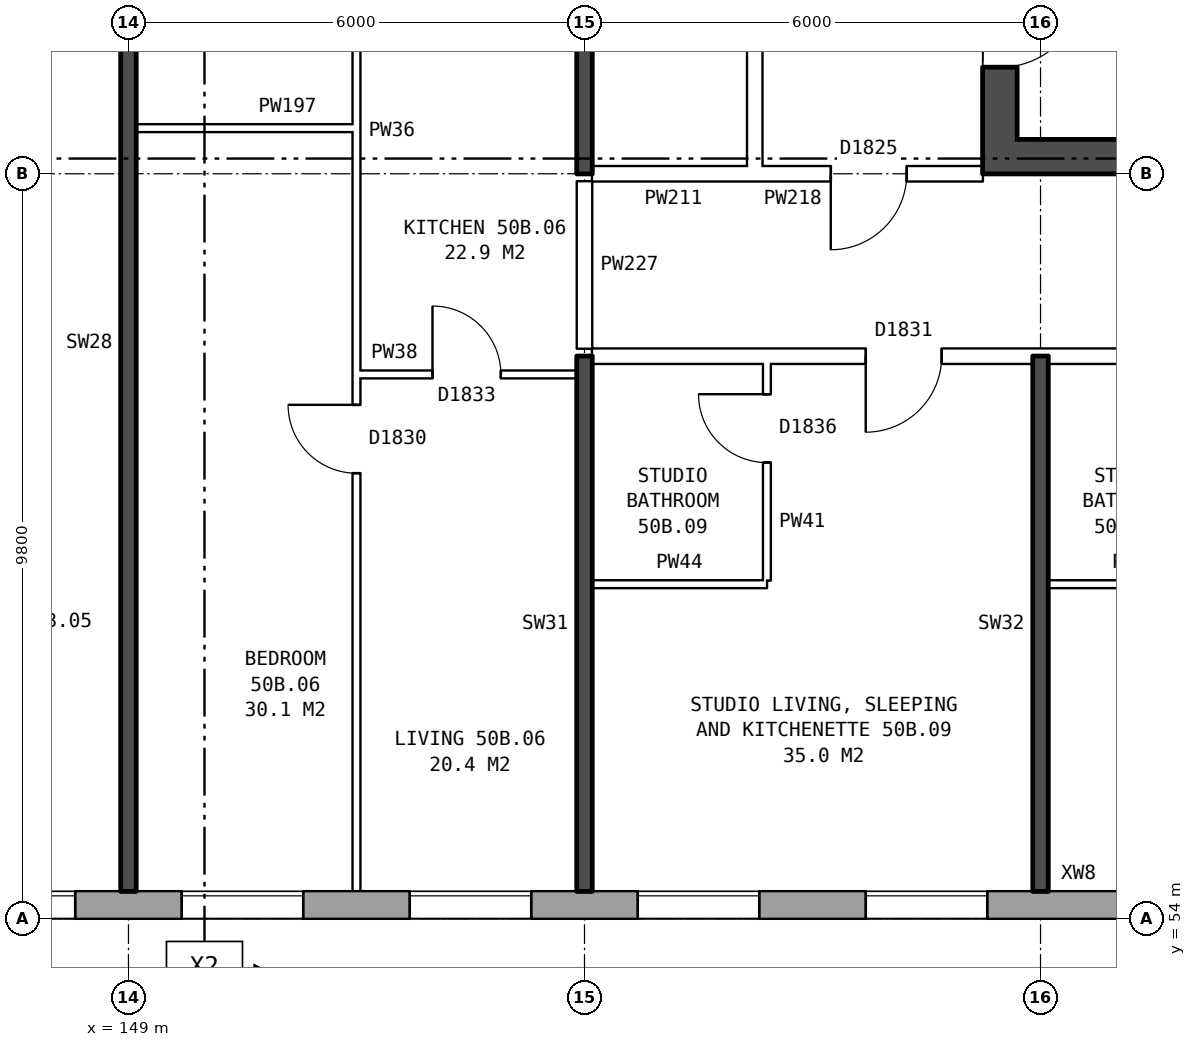
"""IFC4 building model, lengths in metres.
Left out: names, types, materials, properties, quantities, classifications, styles, units other than length and angle.
Written with IfcOpenShell. Run it as: python <this file> out.ifc"""

import sys

from ifc_helpers import new_model, si_unit, direction, frame, frame_2d, origin, place, context, subcontext, project, spatial, rectangle, extrude, element, fill, save


model = new_model("IFC4")
c1 = context("Model", 3, precision=1e-05, world=origin(), true_north=direction((0.0, 1.0)))
c2 = subcontext(c1, "Body", "Model", "MODEL_VIEW")
j1 = project(units=[si_unit("LENGTHUNIT", "METRE"), si_unit("PLANEANGLEUNIT", "RADIAN")], contexts=[c1])
p1 = place(None, origin())
s1 = spatial("IfcSite", under=j1, at=p1, CompositionType="ELEMENT")
p2 = place(p1, origin())
s2 = spatial("IfcBuilding", under=s1, at=p2, CompositionType="ELEMENT")
p3 = place(p2, frame((0.0, 0.0, 178.9)))
s3 = spatial("IfcBuildingStorey", under=s2, at=p3, CompositionType="ELEMENT", Elevation=178.9)
p4 = place(p3, frame((134.075, 54.18, 0.0), z_axis=(0.0, 0.0, 1.0), x_axis=(1.0, 0.0, 0.0)))
e1 = element("IfcWall", 1, at=p4, inside=s3, PredefinedType="STANDARD", context=c2, shape_type="SweptSolid", body=[
    extrude(rectangle(XDim=33.101, YDim=0.36, at=frame_2d((16.55, 0.0))), origin(), (0.0, 0.0, 1.0), 2.85),
])
p5 = place(p4, frame((0.625, 0.0, 0.8)))
e2 = element("IfcOpeningElement", 2, at=p5, cuts=e1, PredefinedType="OPENING", context=c2, shape_type="SweptSolid", body=[
    extrude(rectangle(XDim=1.6, YDim=1.8, at=frame_2d((0.8, 0.9))), frame((0.0, 0.19, 0.0), z_axis=(0.0, -1.0, 0.0), x_axis=(1.0, 0.0, 0.0)), (0.0, 0.0, 1.0), 0.38),
])
p6 = place(p4, frame((3.125, 0.0, 1.1)))
e3 = element("IfcOpeningElement", 3, at=p6, cuts=e1, PredefinedType="OPENING", context=c2, shape_type="SweptSolid", body=[
    extrude(rectangle(XDim=0.8, YDim=1.5, at=frame_2d((0.4, 0.75))), frame((0.0, 0.19, 0.0), z_axis=(0.0, -1.0, 0.0), x_axis=(1.0, 0.0, 0.0)), (0.0, 0.0, 1.0), 0.38),
])
p7 = place(p4, frame((6.625, 0.0, 0.8)))
e4 = element("IfcOpeningElement", 4, at=p7, cuts=e1, PredefinedType="OPENING", context=c2, shape_type="SweptSolid", body=[
    extrude(rectangle(XDim=1.6, YDim=1.8, at=frame_2d((0.8, 0.9))), frame((0.0, 0.19, 0.0), z_axis=(0.0, -1.0, 0.0), x_axis=(1.0, 0.0, 0.0)), (0.0, 0.0, 1.0), 0.38),
])
p8 = place(p4, frame((9.625, 0.0, 0.8)))
e5 = element("IfcOpeningElement", 5, at=p8, cuts=e1, PredefinedType="OPENING", context=c2, shape_type="SweptSolid", body=[
    extrude(rectangle(XDim=1.6, YDim=1.8, at=frame_2d((0.8, 0.9))), frame((0.0, 0.19, 0.0), z_axis=(0.0, -1.0, 0.0), x_axis=(1.0, 0.0, 0.0)), (0.0, 0.0, 1.0), 0.38),
])
p9 = place(p4, frame((12.625, 0.0, 0.8)))
e6 = element("IfcOpeningElement", 6, at=p9, cuts=e1, PredefinedType="OPENING", context=c2, shape_type="SweptSolid", body=[
    extrude(rectangle(XDim=1.6, YDim=1.8, at=frame_2d((0.8, 0.9))), frame((0.0, 0.19, 0.0), z_axis=(0.0, -1.0, 0.0), x_axis=(1.0, 0.0, 0.0)), (0.0, 0.0, 1.0), 0.38),
])
p10 = place(p4, frame((15.625, 0.0, 0.8)))
e7 = element("IfcOpeningElement", 7, at=p10, cuts=e1, PredefinedType="OPENING", context=c2, shape_type="SweptSolid", body=[
    extrude(rectangle(XDim=1.6, YDim=1.8, at=frame_2d((0.8, 0.9))), frame((0.0, 0.19, 0.0), z_axis=(0.0, -1.0, 0.0), x_axis=(1.0, 0.0, 0.0)), (0.0, 0.0, 1.0), 0.38),
])
p11 = place(p4, frame((18.625, 0.0, 0.8)))
e8 = element("IfcOpeningElement", 8, at=p11, cuts=e1, PredefinedType="OPENING", context=c2, shape_type="SweptSolid", body=[
    extrude(rectangle(XDim=1.6, YDim=1.8, at=frame_2d((0.8, 0.9))), frame((0.0, 0.19, 0.0), z_axis=(0.0, -1.0, 0.0), x_axis=(1.0, 0.0, 0.0)), (0.0, 0.0, 1.0), 0.38),
])
p12 = place(p4, frame((21.625, 0.0, 0.8)))
e9 = element("IfcOpeningElement", 9, at=p12, cuts=e1, PredefinedType="OPENING", context=c2, shape_type="SweptSolid", body=[
    extrude(rectangle(XDim=1.6, YDim=1.8, at=frame_2d((0.8, 0.9))), frame((0.0, 0.19, 0.0), z_axis=(0.0, -1.0, 0.0), x_axis=(1.0, 0.0, 0.0)), (0.0, 0.0, 1.0), 0.38),
])
p13 = place(p4, frame((24.625, 0.0, 0.8)))
e10 = element("IfcOpeningElement", 10, at=p13, cuts=e1, PredefinedType="OPENING", context=c2, shape_type="SweptSolid", body=[
    extrude(rectangle(XDim=1.6, YDim=1.8, at=frame_2d((0.8, 0.9))), frame((0.0, 0.19, 0.0), z_axis=(0.0, -1.0, 0.0), x_axis=(1.0, 0.0, 0.0)), (0.0, 0.0, 1.0), 0.38),
])
p14 = place(p4, frame((28.625, 0.0, 1.7)))
e11 = element("IfcOpeningElement", 11, at=p14, cuts=e1, PredefinedType="OPENING", context=c2, shape_type="SweptSolid", body=[
    extrude(rectangle(XDim=0.6, YDim=0.9, at=frame_2d((0.3, 0.45))), frame((0.0, 0.19, 0.0), z_axis=(0.0, -1.0, 0.0), x_axis=(1.0, 0.0, 0.0)), (0.0, 0.0, 1.0), 0.38),
])
p15 = place(p4, frame((30.625, 0.0, 0.8)))
e12 = element("IfcOpeningElement", 12, at=p15, cuts=e1, PredefinedType="OPENING", context=c2, shape_type="SweptSolid", body=[
    extrude(rectangle(XDim=1.6, YDim=1.8, at=frame_2d((0.8, 0.9))), frame((0.0, 0.19, 0.0), z_axis=(0.0, -1.0, 0.0), x_axis=(1.0, 0.0, 0.0)), (0.0, 0.0, 1.0), 0.38),
])
p16 = place(p4, frame((5.475, 0.0, 0.8)))
e13 = element("IfcOpeningElement", 13, at=p16, cuts=e1, PredefinedType="OPENING", context=c2, shape_type="SweptSolid", body=[
    extrude(rectangle(XDim=0.8, YDim=0.9, at=frame_2d((0.4, 0.45))), frame((0.0, 0.19, 0.0), z_axis=(0.0, -1.0, 0.0), x_axis=(1.0, 0.0, 0.0)), (0.0, 0.0, 1.0), 0.38),
])
p17 = place(p4, frame((29.525, 0.0, 0.8)))
e14 = element("IfcOpeningElement", 14, at=p17, cuts=e1, PredefinedType="OPENING", context=c2, shape_type="SweptSolid", body=[
    extrude(rectangle(XDim=0.8, YDim=1.8, at=frame_2d((0.4, 0.9))), frame((0.0, 0.19, 0.0), z_axis=(0.0, -1.0, 0.0), x_axis=(1.0, 0.0, 0.0)), (0.0, 0.0, 1.0), 0.38),
])
p18 = place(p3, frame((160.465, 76.2, 0.0), z_axis=(0.0, 0.0, 1.0), x_axis=(0.0, -1.0, 0.0)))
e15 = element("IfcWall", 15, at=p18, inside=s3, PredefinedType="SHEAR", context=c2, shape_type="SweptSolid", body=[
    extrude(rectangle(XDim=12.4, YDim=0.45, at=frame_2d((6.2, 0.0))), origin(), (0.0, 0.0, 1.0), 2.85),
])
p19 = place(p18, frame((1.325, 0.0, 0.0)))
e16 = element("IfcOpeningElement", 16, at=p19, cuts=e15, PredefinedType="OPENING", context=c2, shape_type="SweptSolid", body=[
    extrude(rectangle(XDim=1.1, YDim=2.1, at=frame_2d((0.55, 1.05))), frame((0.0, 0.235, 0.0), z_axis=(0.0, -1.0, 0.0), x_axis=(1.0, 0.0, 0.0)), (0.0, 0.0, 1.0), 0.47),
])
p20 = place(p18, frame((4.825, 0.0, 0.0)))
e17 = element("IfcOpeningElement", 17, at=p20, cuts=e15, PredefinedType="OPENING", context=c2, shape_type="SweptSolid", body=[
    extrude(rectangle(XDim=0.85, YDim=2.1, at=frame_2d((0.425, 1.05))), frame((0.0, 0.235, 0.0), z_axis=(0.0, -1.0, 0.0), x_axis=(1.0, 0.0, 0.0)), (0.0, 0.0, 1.0), 0.47),
])
p21 = place(p18, frame((9.9, 0.0, 0.0)))
e18 = element("IfcOpeningElement", 18, at=p21, cuts=e15, PredefinedType="OPENING", context=c2, shape_type="SweptSolid", body=[
    extrude(rectangle(XDim=1.1, YDim=2.1, at=frame_2d((0.55, 1.05))), frame((0.0, 0.235, 0.0), z_axis=(0.0, -1.0, 0.0), x_axis=(1.0, 0.0, 0.0)), (0.0, 0.0, 1.0), 0.47),
])
p22 = place(p18, frame((8.125, 0.0, 0.0)))
e19 = element("IfcOpeningElement", 19, at=p22, cuts=e15, PredefinedType="OPENING", context=c2, shape_type="SweptSolid", body=[
    extrude(rectangle(XDim=0.85, YDim=2.1, at=frame_2d((0.425, 1.05))), frame((0.0, 0.235, 0.0), z_axis=(0.0, -1.0, 0.0), x_axis=(1.0, 0.0, 0.0)), (0.0, 0.0, 1.0), 0.47),
])
p23 = place(p3, frame((160.69, 64.025, 0.0), z_axis=(0.0, 0.0, 1.0), x_axis=(1.0, 0.0, 0.0)))
e20 = element("IfcWall", 20, at=p23, inside=s3, PredefinedType="SHEAR", context=c2, shape_type="SweptSolid", body=[
    extrude(rectangle(XDim=7.5, YDim=0.45, at=frame_2d((3.75, 0.0))), origin(), (0.0, 0.0, 1.0), 2.85),
])
p24 = place(p3, frame((157.24, 63.9, 0.0), z_axis=(0.0, 0.0, 1.0), x_axis=(0.0, 1.0, 0.0)))
e21 = element("IfcWall", 21, at=p24, inside=s3, PredefinedType="PARTITIONING", context=c2, shape_type="SweptSolid", body=[
    extrude(rectangle(XDim=12.2, YDim=0.2, at=frame_2d((6.1, 0.0))), origin(), (0.0, 0.0, 1.0), 2.85),
])
p25 = place(p24, frame((5.1, 0.0, 0.0)))
e22 = element("IfcOpeningElement", 22, at=p25, cuts=e21, PredefinedType="OPENING", context=c2, shape_type="SweptSolid", body=[
    extrude(rectangle(XDim=2.0, YDim=2.1, at=frame_2d((1.0, 1.05))), frame((0.0, 0.11, 0.0), z_axis=(0.0, -1.0, 0.0), x_axis=(1.0, 0.0, 0.0)), (0.0, 0.0, 1.0), 0.22),
])
for number, where, z_axis, x_axis in (
    (23, (155.1, 58.4, 0.0), (0.0, 0.0, 1.0), (1.0, 0.0, 0.0)),
    (24, (161.1, 58.4, 0.0), (0.0, 0.0, 1.0), (1.0, 0.0, 0.0)),
):
    element("IfcWall", number, at=place(p3, frame(where, z_axis=z_axis, x_axis=x_axis)), inside=s3, PredefinedType="PARTITIONING", context=c2, shape_type="SweptSolid", body=[
        extrude(rectangle(XDim=2.3, YDim=0.1, at=frame_2d((1.15, 0.0))), origin(), (0.0, 0.0, 1.0), 2.85),
    ])
p26 = place(p3, frame((152.0, 61.16, 0.0), z_axis=(0.0, 0.0, 1.0), x_axis=(1.0, 0.0, 0.0)))
e25 = element("IfcWall", 25, at=p26, inside=s3, PredefinedType="PARTITIONING", context=c2, shape_type="SweptSolid", body=[
    extrude(rectangle(XDim=2.9, YDim=0.1, at=frame_2d((1.45, 0.0))), origin(), (0.0, 0.0, 1.0), 2.85),
])
p27 = place(p26, frame((1.0, 0.0, 0.0)))
e26 = element("IfcOpeningElement", 26, at=p27, cuts=e25, PredefinedType="OPENING", context=c2, shape_type="SweptSolid", body=[
    extrude(rectangle(XDim=0.9, YDim=2.1, at=frame_2d((0.45, 1.05))), frame((0.0, 0.06, 0.0), z_axis=(0.0, -1.0, 0.0), x_axis=(1.0, 0.0, 0.0)), (0.0, 0.0, 1.0), 0.12),
])
p28 = place(p3, frame((155.1, 61.4, 0.0), z_axis=(0.0, 0.0, 1.0), x_axis=(1.0, 0.0, 0.0)))
e27 = element("IfcWall", 27, at=p28, inside=s3, PredefinedType="PARTITIONING", context=c2, shape_type="SweptSolid", body=[
    extrude(rectangle(XDim=14.79, YDim=0.2, at=frame_2d((7.395, 0.0))), origin(), (0.0, 0.0, 1.0), 2.85),
])
p29 = place(p28, frame((3.6, 0.0, 0.0)))
e28 = element("IfcOpeningElement", 28, at=p29, cuts=e27, PredefinedType="OPENING", context=c2, shape_type="SweptSolid", body=[
    extrude(rectangle(XDim=1.0, YDim=2.1, at=frame_2d((0.5, 1.05))), frame((0.0, 0.11, 0.0), z_axis=(0.0, -1.0, 0.0), x_axis=(1.0, 0.0, 0.0)), (0.0, 0.0, 1.0), 0.22),
])
p30 = place(p28, frame((11.045, 0.0, 0.0)))
e29 = element("IfcOpeningElement", 29, at=p30, cuts=e27, PredefinedType="OPENING", context=c2, shape_type="SweptSolid", body=[
    extrude(rectangle(XDim=1.0, YDim=2.1, at=frame_2d((0.5, 1.05))), frame((0.0, 0.11, 0.0), z_axis=(0.0, -1.0, 0.0), x_axis=(1.0, 0.0, 0.0)), (0.0, 0.0, 1.0), 0.22),
])
p31 = place(p3, frame((155.1, 63.8, 0.0), z_axis=(0.0, 0.0, 1.0), x_axis=(1.0, 0.0, 0.0)))
e30 = element("IfcWall", 30, at=p31, inside=s3, PredefinedType="PARTITIONING", context=c2, shape_type="SweptSolid", body=[
    extrude(rectangle(XDim=2.14, YDim=0.2, at=frame_2d((1.07, 0.0))), origin(), (0.0, 0.0, 1.0), 2.85),
])
p32 = place(p3, frame((157.24, 63.8, 0.0), z_axis=(0.0, 0.0, 1.0), x_axis=(1.0, 0.0, 0.0)))
e31 = element("IfcWall", 31, at=p32, inside=s3, PredefinedType="PARTITIONING", context=c2, shape_type="SweptSolid", body=[
    extrude(rectangle(XDim=3.0, YDim=0.2, at=frame_2d((1.5, 0.0))), origin(), (0.0, 0.0, 1.0), 2.85),
])
p33 = place(p32, frame((1.0, 0.0, 0.0)))
e32 = element("IfcOpeningElement", 32, at=p33, cuts=e31, PredefinedType="OPENING", context=c2, shape_type="SweptSolid", body=[
    extrude(rectangle(XDim=1.0, YDim=2.1, at=frame_2d((0.5, 1.05))), frame((0.0, 0.11, 0.0), z_axis=(0.0, -1.0, 0.0), x_axis=(1.0, 0.0, 0.0)), (0.0, 0.0, 1.0), 0.22),
])
p34 = place(p3, frame((149.1, 64.4, 0.0), z_axis=(0.0, 0.0, 1.0), x_axis=(1.0, 0.0, 0.0)))
e33 = element("IfcWall", 33, at=p34, inside=s3, PredefinedType="PARTITIONING", context=c2, shape_type="SweptSolid", body=[
    extrude(rectangle(XDim=2.9, YDim=0.1, at=frame_2d((1.45, 0.0))), origin(), (0.0, 0.0, 1.0), 2.85),
])
p35 = place(p3, frame((149.0, 54.36, 0.0), z_axis=(0.0, 0.0, 1.0), x_axis=(0.0, 1.0, 0.0)))
e34 = element("IfcWall", 34, at=p35, inside=s3, PredefinedType="SOLIDWALL", context=c2, shape_type="SweptSolid", body=[
    extrude(rectangle(XDim=14.44, YDim=0.2, at=frame_2d((7.22, 0.0))), origin(), (0.0, 0.0, 1.0), 2.85),
])
p36 = place(p3, frame((152.0, 54.36, 0.0), z_axis=(0.0, 0.0, 1.0), x_axis=(0.0, 1.0, 0.0)))
e35 = element("IfcWall", 35, at=p36, inside=s3, PredefinedType="PARTITIONING", context=c2, shape_type="SweptSolid", body=[
    extrude(rectangle(XDim=14.34, YDim=0.1, at=frame_2d((7.17, 0.0))), origin(), (0.0, 0.0, 1.0), 2.85),
])
p37 = place(p36, frame((5.5, 0.0, 0.0)))
e36 = element("IfcOpeningElement", 36, at=p37, cuts=e35, PredefinedType="OPENING", context=c2, shape_type="SweptSolid", body=[
    extrude(rectangle(XDim=0.9, YDim=2.1, at=frame_2d((0.45, 1.05))), frame((0.0, 0.06, 0.0), z_axis=(0.0, -1.0, 0.0), x_axis=(1.0, 0.0, 0.0)), (0.0, 0.0, 1.0), 0.12),
])
p38 = place(p36, frame((13.04, 0.0, 0.0)))
e37 = element("IfcOpeningElement", 37, at=p38, cuts=e35, PredefinedType="OPENING", context=c2, shape_type="SweptSolid", body=[
    extrude(rectangle(XDim=0.9, YDim=2.1, at=frame_2d((0.45, 1.05))), frame((0.0, 0.06, 0.0), z_axis=(0.0, -1.0, 0.0), x_axis=(1.0, 0.0, 0.0)), (0.0, 0.0, 1.0), 0.12),
])
p39 = place(p3, frame((155.0, 54.36, 0.0), z_axis=(0.0, 0.0, 1.0), x_axis=(0.0, 1.0, 0.0)))
e38 = element("IfcWall", 38, at=p39, inside=s3, PredefinedType="SOLIDWALL", context=c2, shape_type="SweptSolid", body=[
    extrude(rectangle(XDim=7.04, YDim=0.2, at=frame_2d((3.52, 0.0))), origin(), (0.0, 0.0, 1.0), 2.85),
])
p40 = place(p3, frame((155.0, 61.5, 0.0), z_axis=(0.0, 0.0, 1.0), x_axis=(0.0, 1.0, 0.0)))
e39 = element("IfcWall", 39, at=p40, inside=s3, PredefinedType="PARTITIONING", context=c2, shape_type="SweptSolid", body=[
    extrude(rectangle(XDim=2.2, YDim=0.2, at=frame_2d((1.1, 0.0))), origin(), (0.0, 0.0, 1.0), 2.85),
])
p41 = place(p3, frame((155.0, 63.8, 0.0), z_axis=(0.0, 0.0, 1.0), x_axis=(0.0, 1.0, 0.0)))
e40 = element("IfcWall", 40, at=p41, inside=s3, PredefinedType="SOLIDWALL", context=c2, shape_type="SweptSolid", body=[
    extrude(rectangle(XDim=5.0, YDim=0.2, at=frame_2d((2.5, 0.0))), origin(), (0.0, 0.0, 1.0), 2.85),
])
p42 = place(p3, frame((157.4, 58.45, 0.0), z_axis=(0.0, 0.0, 1.0), x_axis=(0.0, 1.0, 0.0)))
e41 = element("IfcWall", 41, at=p42, inside=s3, PredefinedType="PARTITIONING", context=c2, shape_type="SweptSolid", body=[
    extrude(rectangle(XDim=2.85, YDim=0.1, at=frame_2d((1.425, 0.0))), origin(), (0.0, 0.0, 1.0), 2.85),
])
p43 = place(p42, frame((1.55, 0.0, 0.0)))
e42 = element("IfcOpeningElement", 42, at=p43, cuts=e41, PredefinedType="OPENING", context=c2, shape_type="SweptSolid", body=[
    extrude(rectangle(XDim=0.9, YDim=2.1, at=frame_2d((0.45, 1.05))), frame((0.0, 0.06, 0.0), z_axis=(0.0, -1.0, 0.0), x_axis=(1.0, 0.0, 0.0)), (0.0, 0.0, 1.0), 0.12),
])
p44 = place(p3, frame((161.0, 54.36, 0.0), z_axis=(0.0, 0.0, 1.0), x_axis=(0.0, 1.0, 0.0)))
e43 = element("IfcWall", 43, at=p44, inside=s3, PredefinedType="SOLIDWALL", context=c2, shape_type="SweptSolid", body=[
    extrude(rectangle(XDim=7.04, YDim=0.2, at=frame_2d((3.52, 0.0))), origin(), (0.0, 0.0, 1.0), 2.85),
])
p45 = place(p9, origin())
e44 = element("IfcWindow", 44, at=p45, inside=s3, PartitioningType="SINGLE_PANEL", PredefinedType="WINDOW", context=c2, shape_type="SweptSolid", body=[
    extrude(rectangle(XDim=1.6, YDim=1.8, at=frame_2d((0.8, 0.9))), frame((0.0, 0.15, 0.0), z_axis=(0.0, -1.0, 0.0), x_axis=(1.0, 0.0, 0.0)), (0.0, 0.0, 1.0), 0.06),
])
fill(e6, e44)
p46 = place(p10, origin())
e45 = element("IfcWindow", 45, at=p46, inside=s3, PartitioningType="SINGLE_PANEL", PredefinedType="WINDOW", context=c2, shape_type="SweptSolid", body=[
    extrude(rectangle(XDim=1.6, YDim=1.8, at=frame_2d((0.8, 0.9))), frame((0.0, 0.15, 0.0), z_axis=(0.0, -1.0, 0.0), x_axis=(1.0, 0.0, 0.0)), (0.0, 0.0, 1.0), 0.06),
])
fill(e7, e45)
p47 = place(p11, origin())
e46 = element("IfcWindow", 46, at=p47, inside=s3, PartitioningType="SINGLE_PANEL", PredefinedType="WINDOW", context=c2, shape_type="SweptSolid", body=[
    extrude(rectangle(XDim=1.6, YDim=1.8, at=frame_2d((0.8, 0.9))), frame((0.0, 0.15, 0.0), z_axis=(0.0, -1.0, 0.0), x_axis=(1.0, 0.0, 0.0)), (0.0, 0.0, 1.0), 0.06),
])
fill(e8, e46)
p48 = place(p12, origin())
e47 = element("IfcWindow", 47, at=p48, inside=s3, PartitioningType="SINGLE_PANEL", PredefinedType="WINDOW", context=c2, shape_type="SweptSolid", body=[
    extrude(rectangle(XDim=1.6, YDim=1.8, at=frame_2d((0.8, 0.9))), frame((0.0, 0.15, 0.0), z_axis=(0.0, -1.0, 0.0), x_axis=(1.0, 0.0, 0.0)), (0.0, 0.0, 1.0), 0.06),
])
fill(e9, e47)
p49 = place(p13, origin())
e48 = element("IfcWindow", 48, at=p49, inside=s3, PartitioningType="SINGLE_PANEL", PredefinedType="WINDOW", context=c2, shape_type="SweptSolid", body=[
    extrude(rectangle(XDim=1.6, YDim=1.8, at=frame_2d((0.8, 0.9))), frame((0.0, 0.15, 0.0), z_axis=(0.0, -1.0, 0.0), x_axis=(1.0, 0.0, 0.0)), (0.0, 0.0, 1.0), 0.06),
])
fill(e10, e48)
p50 = place(p21, origin())
e49 = element("IfcDoor", 49, at=p50, inside=s3, OperationType="SINGLE_SWING_LEFT", PredefinedType="DOOR", context=c2, shape_type="SweptSolid", body=[
    extrude(rectangle(XDim=1.1, YDim=2.1, at=frame_2d((0.55, 1.05))), frame((0.0, 0.21, 0.0), z_axis=(0.0, -1.0, 0.0), x_axis=(1.0, 0.0, 0.0)), (0.0, 0.0, 1.0), 0.05),
])
fill(e18, e49)
p51 = place(p33, frame((1.0, 0.0, 0.0), z_axis=(0.0, 0.0, 1.0), x_axis=(-1.0, 0.0, 0.0)))
e50 = element("IfcDoor", 50, at=p51, inside=s3, OperationType="SINGLE_SWING_RIGHT", PredefinedType="DOOR", context=c2, shape_type="SweptSolid", body=[
    extrude(rectangle(XDim=1.0, YDim=2.1, at=frame_2d((0.5, 1.05))), frame((0.0, 0.025, 0.0), z_axis=(0.0, -1.0, 0.0), x_axis=(1.0, 0.0, 0.0)), (0.0, 0.0, 1.0), 0.05),
])
fill(e32, e50)
p52 = place(p37, origin())
e51 = element("IfcDoor", 51, at=p52, inside=s3, OperationType="SINGLE_SWING_RIGHT", PredefinedType="DOOR", context=c2, shape_type="SweptSolid", body=[
    extrude(rectangle(XDim=0.9, YDim=2.1, at=frame_2d((0.45, 1.05))), frame((0.0, 0.025, 0.0), z_axis=(0.0, -1.0, 0.0), x_axis=(1.0, 0.0, 0.0)), (0.0, 0.0, 1.0), 0.05),
])
fill(e36, e51)
p53 = place(p27, origin())
e52 = element("IfcDoor", 52, at=p53, inside=s3, OperationType="SINGLE_SWING_LEFT", PredefinedType="DOOR", context=c2, shape_type="SweptSolid", body=[
    extrude(rectangle(XDim=0.9, YDim=2.1, at=frame_2d((0.45, 1.05))), frame((0.0, 0.025, 0.0), z_axis=(0.0, -1.0, 0.0), x_axis=(1.0, 0.0, 0.0)), (0.0, 0.0, 1.0), 0.05),
])
fill(e26, e52)
p54 = place(p29, frame((1.0, 0.0, 0.0), z_axis=(0.0, 0.0, 1.0), x_axis=(-1.0, 0.0, 0.0)))
e53 = element("IfcDoor", 53, at=p54, inside=s3, OperationType="SINGLE_SWING_RIGHT", PredefinedType="DOOR", context=c2, shape_type="SweptSolid", body=[
    extrude(rectangle(XDim=1.0, YDim=2.1, at=frame_2d((0.5, 1.05))), frame((0.0, 0.025, 0.0), z_axis=(0.0, -1.0, 0.0), x_axis=(1.0, 0.0, 0.0)), (0.0, 0.0, 1.0), 0.05),
])
fill(e28, e53)
p55 = place(p43, origin())
e54 = element("IfcDoor", 54, at=p55, inside=s3, OperationType="SINGLE_SWING_RIGHT", PredefinedType="DOOR", context=c2, shape_type="SweptSolid", body=[
    extrude(rectangle(XDim=0.9, YDim=2.1, at=frame_2d((0.45, 1.05))), frame((0.0, 0.025, 0.0), z_axis=(0.0, -1.0, 0.0), x_axis=(1.0, 0.0, 0.0)), (0.0, 0.0, 1.0), 0.05),
])
fill(e42, e54)
save(model, sys.argv[1])
